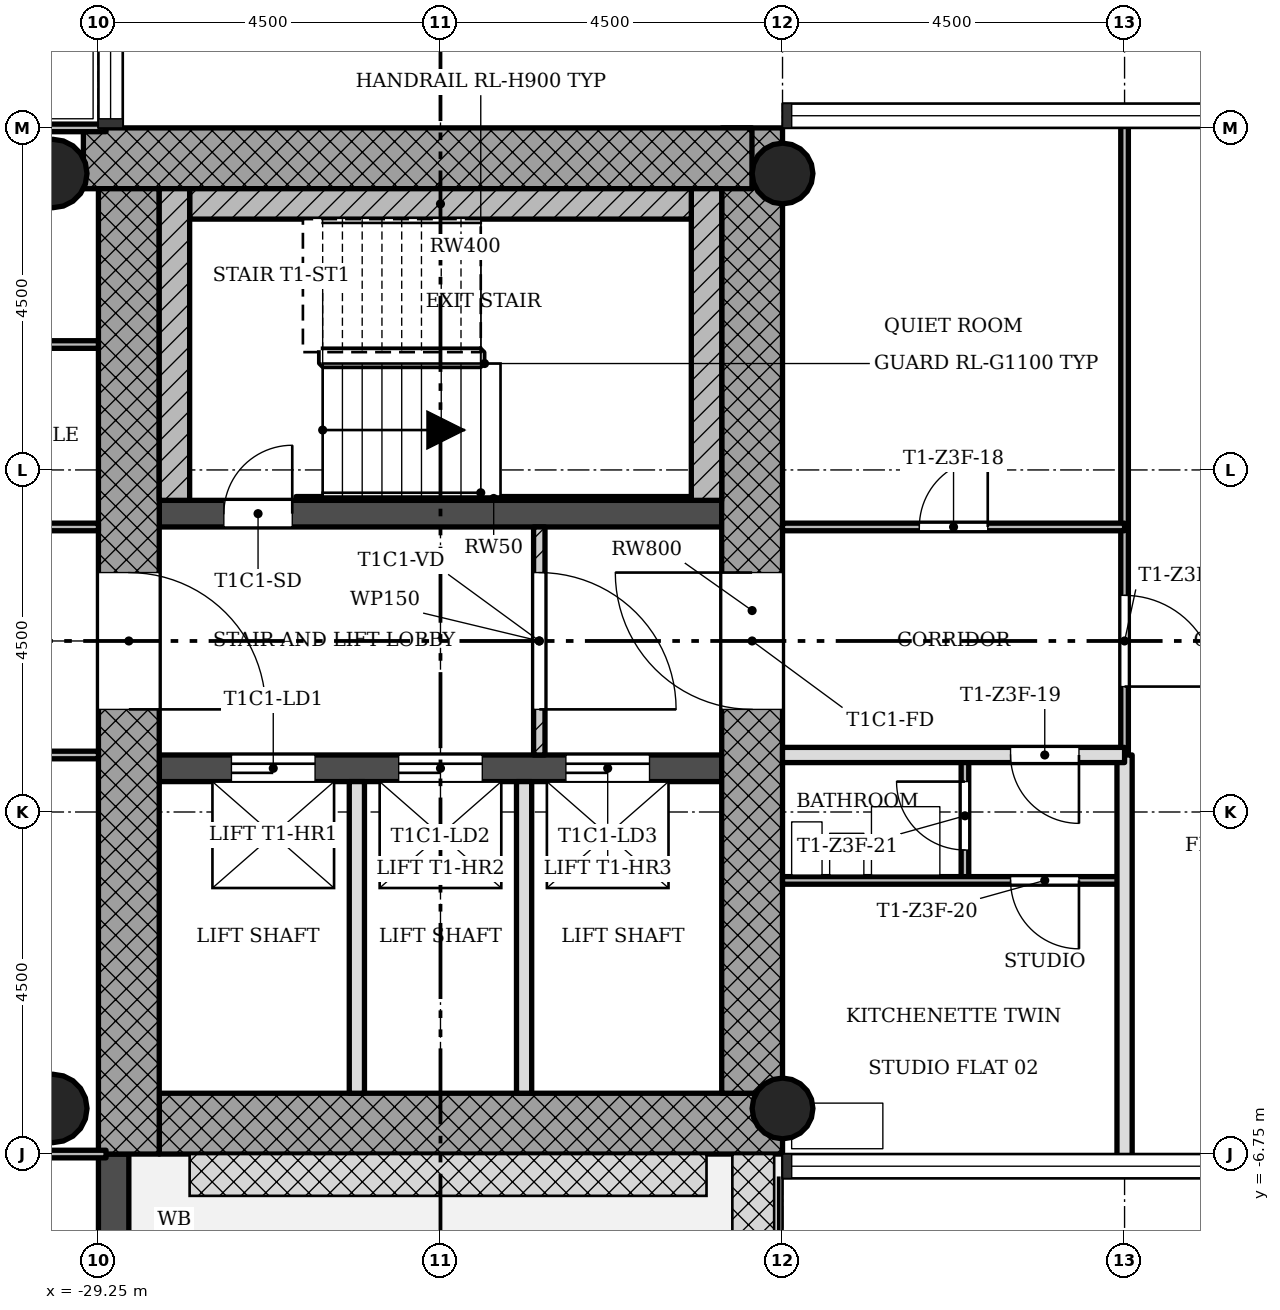
"""IFC4 building model, lengths in metres.
Left out: names, types, materials, properties, quantities, classifications, styles, units other than length and angle.
Written with IfcOpenShell. Run it as: python <this file> out.ifc"""

import sys

from ifc_helpers import new_model, si_unit, direction, frame, frame_2d, origin, origin_2d, place, context, subcontext, project, spatial, rectangle, hollow_circle, extrude, element, fill, save


model = new_model("IFC4")
c1 = context("Model", 3, precision=1e-05, world=origin(), true_north=direction((0.0, 1.0)))
c2 = subcontext(c1, "Body", "Model", "MODEL_VIEW")
j1 = project(units=[si_unit("LENGTHUNIT", "METRE"), si_unit("PLANEANGLEUNIT", "RADIAN")], contexts=[c1])
p1 = place(None, origin())
s1 = spatial("IfcSite", under=j1, at=p1, CompositionType="ELEMENT")
p2 = place(p1, origin())
s2 = spatial("IfcBuilding", under=s1, at=p2, CompositionType="ELEMENT")
p3 = place(p2, frame((0.0, 0.0, 167.7)))
s3 = spatial("IfcBuildingStorey", under=s2, at=p3, CompositionType="ELEMENT", Elevation=167.7)
p4 = place(p3, frame((-28.45, -6.35, 0.0), z_axis=(0.0, 0.0, 1.0), x_axis=(1.0, 0.0, 0.0)))
e1 = element("IfcWall", 1, at=p4, inside=s3, PredefinedType="SHEAR", context=c2, shape_type="SweptSolid", body=[
    extrude(rectangle(XDim=8.2, YDim=0.8, at=frame_2d((4.1, 0.0))), origin(), (0.0, 0.0, 1.0), 3.4),
])
p5 = place(p3, frame((-20.65, -5.95, 0.0), z_axis=(0.0, 0.0, 1.0), x_axis=(0.0, 1.0, 0.0)))
e2 = element("IfcWall", 2, at=p5, inside=s3, PredefinedType="SHEAR", context=c2, shape_type="SweptSolid", body=[
    extrude(rectangle(XDim=12.7, YDim=0.8, at=frame_2d((6.35, 0.0))), origin(), (0.0, 0.0, 1.0), 3.4),
])
p6 = place(p5, frame((5.05, 0.0, 0.0)))
e3 = element("IfcOpeningElement", 3, at=p6, cuts=e2, PredefinedType="OPENING", context=c2, shape_type="SweptSolid", body=[
    extrude(rectangle(XDim=1.8, YDim=2.1, at=frame_2d((0.9, 1.05))), frame((0.0, 0.41, 0.0), z_axis=(0.0, -1.0, 0.0), x_axis=(1.0, 0.0, 0.0)), (0.0, 0.0, 1.0), 0.82),
])
p7 = place(p3, frame((-20.652, 6.35, 0.0), z_axis=(0.0, 0.0, 1.0), x_axis=(-1.0, 0.0, 0.0)))
e4 = element("IfcWall", 4, at=p7, inside=s3, PredefinedType="SHEAR", context=c2, shape_type="SweptSolid", body=[
    extrude(rectangle(XDim=8.796, YDim=0.8, at=frame_2d((4.398, 0.0))), origin(), (0.0, 0.0, 1.0), 3.4),
])
p8 = place(p3, frame((-28.85, 5.95, 0.0), z_axis=(0.0, 0.0, 1.0), x_axis=(0.0, -1.0, 0.0)))
e5 = element("IfcWall", 5, at=p8, inside=s3, PredefinedType="SHEAR", context=c2, shape_type="SweptSolid", body=[
    extrude(rectangle(XDim=12.7, YDim=0.8, at=frame_2d((6.35, 0.0))), origin(), (0.0, 0.0, 1.0), 3.4),
])
p9 = place(p8, frame((5.05, 0.0, 0.0)))
e6 = element("IfcOpeningElement", 6, at=p9, cuts=e5, PredefinedType="OPENING", context=c2, shape_type="SweptSolid", body=[
    extrude(rectangle(XDim=1.8, YDim=2.1, at=frame_2d((0.9, 1.05))), frame((0.0, 0.41, 0.0), z_axis=(0.0, -1.0, 0.0), x_axis=(1.0, 0.0, 0.0)), (0.0, 0.0, 1.0), 0.82),
])
p10 = place(p3, frame((-28.45, -1.675, 0.0), z_axis=(0.0, 0.0, 1.0), x_axis=(1.0, 0.0, 0.0)))
e7 = element("IfcWall", 7, at=p10, inside=s3, PredefinedType="SHEAR", context=c2, shape_type="SweptSolid", body=[
    extrude(rectangle(XDim=7.4, YDim=0.35, at=frame_2d((3.7, 0.0))), origin(), (0.0, 0.0, 1.0), 3.4),
])
p11 = place(p10, frame((0.95, 0.0, 0.0)))
e8 = element("IfcOpeningElement", 8, at=p11, cuts=e7, PredefinedType="OPENING", context=c2, shape_type="SweptSolid", body=[
    extrude(rectangle(XDim=1.1, YDim=2.1, at=frame_2d((0.55, 1.05))), frame((0.0, 0.185, 0.0), z_axis=(0.0, -1.0, 0.0), x_axis=(1.0, 0.0, 0.0)), (0.0, 0.0, 1.0), 0.37),
])
p12 = place(p10, frame((3.15, 0.0, 0.0)))
e9 = element("IfcOpeningElement", 9, at=p12, cuts=e7, PredefinedType="OPENING", context=c2, shape_type="SweptSolid", body=[
    extrude(rectangle(XDim=1.1, YDim=2.1, at=frame_2d((0.55, 1.05))), frame((0.0, 0.185, 0.0), z_axis=(0.0, -1.0, 0.0), x_axis=(1.0, 0.0, 0.0)), (0.0, 0.0, 1.0), 0.37),
])
p13 = place(p10, frame((5.35, 0.0, 0.0)))
e10 = element("IfcOpeningElement", 10, at=p13, cuts=e7, PredefinedType="OPENING", context=c2, shape_type="SweptSolid", body=[
    extrude(rectangle(XDim=1.1, YDim=2.1, at=frame_2d((0.55, 1.05))), frame((0.0, 0.185, 0.0), z_axis=(0.0, -1.0, 0.0), x_axis=(1.0, 0.0, 0.0)), (0.0, 0.0, 1.0), 0.37),
])
p14 = place(p3, frame((-28.45, 1.675, 0.0), z_axis=(0.0, 0.0, 1.0), x_axis=(1.0, 0.0, 0.0)))
e11 = element("IfcWall", 11, at=p14, inside=s3, PredefinedType="SHEAR", context=c2, shape_type="SweptSolid", body=[
    extrude(rectangle(XDim=7.4, YDim=0.35, at=frame_2d((3.7, 0.0))), origin(), (0.0, 0.0, 1.0), 3.4),
])
p15 = place(p14, frame((0.85, 0.0, 0.0)))
e12 = element("IfcOpeningElement", 12, at=p15, cuts=e11, PredefinedType="OPENING", context=c2, shape_type="SweptSolid", body=[
    extrude(rectangle(XDim=0.9, YDim=2.1, at=frame_2d((0.45, 1.05))), frame((0.0, 0.185, 0.0), z_axis=(0.0, -1.0, 0.0), x_axis=(1.0, 0.0, 0.0)), (0.0, 0.0, 1.0), 0.37),
])
for number, where, z_axis, x_axis in (
    (13, (-20.25, -6.15, 0.0), (0.0, 0.0, 1.0), (1.0, 0.0, 0.0)),
    (14, (-20.25, 6.15, 0.0), (0.0, 0.0, 1.0), (1.0, 0.0, 0.0)),
):
    element("IfcColumn", number, at=place(p3, frame(where, z_axis=z_axis, x_axis=x_axis)), inside=s3, PredefinedType="COLUMN", context=c2, shape_type="SweptSolid", body=[
        extrude(hollow_circle(Radius=0.4, WallThickness=0.028, at=origin_2d()), origin(), (0.0, 0.0, 1.0), 3.4),
    ])
for number, where, z_axis, x_axis in (
    (15, (-29.85, -6.15, 0.0), (0.0, 0.0, 1.0), (1.0, 0.0, 0.0)),
    (16, (-29.85, 6.15, 0.0), (0.0, 0.0, 1.0), (1.0, 0.0, 0.0)),
):
    element("IfcColumn", number, at=place(p3, frame(where, z_axis=z_axis, x_axis=x_axis)), inside=s3, PredefinedType="COLUMN", context=c2, shape_type="SweptSolid", body=[
        extrude(hollow_circle(Radius=0.45, WallThickness=0.032, at=origin_2d()), origin(), (0.0, 0.0, 1.0), 3.4),
    ])
p16 = place(p3, frame((-29.05, -11.25, -0.02), z_axis=(0.0, 0.0, 1.0), x_axis=(0.0, 1.0, 0.0)))
e17 = element("IfcWall", 17, at=p16, inside=s3, PredefinedType="STANDARD", context=c2, shape_type="SweptSolid", body=[
    extrude(rectangle(XDim=4.5, YDim=0.4, at=frame_2d((2.25, 0.0))), origin(), (0.0, 0.0, 1.0), 3.12),
])
p17 = place(p16, frame((1.35, 0.0, 0.02)))
e18 = element("IfcOpeningElement", 18, at=p17, cuts=e17, PredefinedType="OPENING", context=c2, shape_type="SweptSolid", body=[
    extrude(rectangle(XDim=1.8, YDim=2.1, at=frame_2d((0.9, 1.05))), frame((0.0, 0.21, 0.0), z_axis=(0.0, -1.0, 0.0), x_axis=(1.0, 0.0, 0.0)), (0.0, 0.0, 1.0), 0.42),
])
p18 = place(p3, frame((-23.45, -1.5, 0.0), z_axis=(0.0, 0.0, 1.0), x_axis=(0.0, 1.0, 0.0)))
e19 = element("IfcWall", 19, at=p18, inside=s3, PredefinedType="PARTITIONING", context=c2, shape_type="SweptSolid", body=[
    extrude(rectangle(XDim=3.0, YDim=0.15, at=frame_2d((1.5, 0.0))), origin(), (0.0, 0.0, 1.0), 3.0),
])
p19 = place(p18, frame((0.6, 0.0, 0.0)))
e20 = element("IfcOpeningElement", 20, at=p19, cuts=e19, PredefinedType="OPENING", context=c2, shape_type="SweptSolid", body=[
    extrude(rectangle(XDim=1.8, YDim=2.1, at=frame_2d((0.9, 1.05))), frame((0.0, 0.085, 0.0), z_axis=(0.0, -1.0, 0.0), x_axis=(1.0, 0.0, 0.0)), (0.0, 0.0, 1.0), 0.17),
])
for number, where, z_axis, x_axis in (
    (21, (-25.85, -5.95, 0.0), (0.0, 0.0, 1.0), (0.0, 1.0, 0.0)),
    (22, (-23.65, -5.95, 0.0), (0.0, 0.0, 1.0), (0.0, 1.0, 0.0)),
):
    element("IfcWall", number, at=place(p3, frame(where, z_axis=z_axis, x_axis=x_axis)), inside=s3, PredefinedType="SOLIDWALL", context=c2, shape_type="SweptSolid", body=[
        extrude(rectangle(XDim=4.1, YDim=0.2, at=frame_2d((2.05, 0.0))), origin(), (0.0, 0.0, 1.0), 3.0),
    ])
p20 = place(p3, frame((-17.85, -3.15, 0.0), z_axis=(0.0, 0.0, 1.0), x_axis=(0.0, 1.0, 0.0)))
e23 = element("IfcWall", 23, at=p20, inside=s3, PredefinedType="PARTITIONING", context=c2, shape_type="SweptSolid", body=[
    extrude(rectangle(XDim=1.65, YDim=0.1, at=frame_2d((0.825, 0.0))), origin(), (0.0, 0.0, 1.0), 3.0),
])
p21 = place(p20, frame((0.4, 0.0, 0.0)))
e24 = element("IfcOpeningElement", 24, at=p21, cuts=e23, PredefinedType="OPENING", context=c2, shape_type="SweptSolid", body=[
    extrude(rectangle(XDim=0.9, YDim=2.1, at=frame_2d((0.45, 1.05))), frame((0.0, 0.06, 0.0), z_axis=(0.0, -1.0, 0.0), x_axis=(1.0, 0.0, 0.0)), (0.0, 0.0, 1.0), 0.12),
])
p22 = place(p3, frame((-15.75, -1.5, 0.0), z_axis=(0.0, 0.0, 1.0), x_axis=(0.0, 1.0, 0.0)))
e25 = element("IfcWall", 25, at=p22, inside=s3, PredefinedType="PARTITIONING", context=c2, shape_type="SweptSolid", body=[
    extrude(rectangle(XDim=8.35, YDim=0.1, at=frame_2d((4.175, 0.0))), origin(), (0.0, 0.0, 1.0), 3.0),
])
p23 = place(p22, frame((0.9, 0.0, 0.0)))
e26 = element("IfcOpeningElement", 26, at=p23, cuts=e25, PredefinedType="OPENING", context=c2, shape_type="SweptSolid", body=[
    extrude(rectangle(XDim=1.2, YDim=2.1, at=frame_2d((0.6, 1.05))), frame((0.0, 0.06, 0.0), z_axis=(0.0, -1.0, 0.0), x_axis=(1.0, 0.0, 0.0)), (0.0, 0.0, 1.0), 0.12),
])
p24 = place(p3, frame((-15.75, -6.85, 0.0), z_axis=(0.0, 0.0, 1.0), x_axis=(0.0, 1.0, 0.0)))
e27 = element("IfcWall", 27, at=p24, inside=s3, PredefinedType="SOLIDWALL", context=c2, shape_type="SweptSolid", body=[
    extrude(rectangle(XDim=5.35, YDim=0.2, at=frame_2d((2.675, 0.0))), origin(), (0.0, 0.0, 1.0), 3.0),
])
p25 = place(p3, frame((-35.1, -6.75, 0.0), z_axis=(0.0, 0.0, 1.0), x_axis=(1.0, 0.0, 0.0)))
e28 = element("IfcWall", 28, at=p25, inside=s3, PredefinedType="PARTITIONING", context=c2, shape_type="SweptSolid", body=[
    extrude(rectangle(XDim=5.95, YDim=0.1, at=frame_2d((2.975, 0.0))), origin(), (0.0, 0.0, 1.0), 3.0),
])
p26 = place(p3, frame((-20.25, -3.15, 0.0), z_axis=(0.0, 0.0, 1.0), x_axis=(1.0, 0.0, 0.0)))
e29 = element("IfcWall", 29, at=p26, inside=s3, PredefinedType="PARTITIONING", context=c2, shape_type="SweptSolid", body=[
    extrude(rectangle(XDim=4.5, YDim=0.1, at=frame_2d((2.25, 0.0))), origin(), (0.0, 0.0, 1.0), 3.0),
])
p27 = place(p26, frame((3.0, 0.0, 0.0)))
e30 = element("IfcOpeningElement", 30, at=p27, cuts=e29, PredefinedType="OPENING", context=c2, shape_type="SweptSolid", body=[
    extrude(rectangle(XDim=0.9, YDim=2.1, at=frame_2d((0.45, 1.05))), frame((0.0, 0.06, 0.0), z_axis=(0.0, -1.0, 0.0), x_axis=(1.0, 0.0, 0.0)), (0.0, 0.0, 1.0), 0.12),
])
p28 = place(p3, frame((-31.5, -1.5, 0.0), z_axis=(0.0, 0.0, 1.0), x_axis=(1.0, 0.0, 0.0)))
e31 = element("IfcWall", 31, at=p28, inside=s3, PredefinedType="PARTITIONING", context=c2, shape_type="SweptSolid", body=[
    extrude(rectangle(XDim=2.25, YDim=0.1, at=frame_2d((1.125, 0.0))), origin(), (0.0, 0.0, 1.0), 3.0),
])
p29 = place(p3, frame((-20.25, -1.5, 0.0), z_axis=(0.0, 0.0, 1.0), x_axis=(1.0, 0.0, 0.0)))
e32 = element("IfcWall", 32, at=p29, inside=s3, PredefinedType="SOLIDWALL", context=c2, shape_type="SweptSolid", body=[
    extrude(rectangle(XDim=4.5, YDim=0.2, at=frame_2d((2.25, 0.0))), origin(), (0.0, 0.0, 1.0), 3.0),
])
p30 = place(p29, frame((3.0, 0.0, 0.0)))
e33 = element("IfcOpeningElement", 33, at=p30, cuts=e32, PredefinedType="OPENING", context=c2, shape_type="SweptSolid", body=[
    extrude(rectangle(XDim=0.9, YDim=2.1, at=frame_2d((0.45, 1.05))), frame((0.0, 0.11, 0.0), z_axis=(0.0, -1.0, 0.0), x_axis=(1.0, 0.0, 0.0)), (0.0, 0.0, 1.0), 0.22),
])
p31 = place(p3, frame((-31.5, 1.5, 0.0), z_axis=(0.0, 0.0, 1.0), x_axis=(1.0, 0.0, 0.0)))
e34 = element("IfcWall", 34, at=p31, inside=s3, PredefinedType="PARTITIONING", context=c2, shape_type="SweptSolid", body=[
    extrude(rectangle(XDim=2.25, YDim=0.1, at=frame_2d((1.125, 0.0))), origin(), (0.0, 0.0, 1.0), 3.0),
])
p32 = place(p31, frame((0.675, 0.0, 0.0)))
e35 = element("IfcOpeningElement", 35, at=p32, cuts=e34, PredefinedType="OPENING", context=c2, shape_type="SweptSolid", body=[
    extrude(rectangle(XDim=0.9, YDim=2.1, at=frame_2d((0.45, 1.05))), frame((0.0, 0.06, 0.0), z_axis=(0.0, -1.0, 0.0), x_axis=(1.0, 0.0, 0.0)), (0.0, 0.0, 1.0), 0.12),
])
p33 = place(p3, frame((-20.25, 1.5, 0.0), z_axis=(0.0, 0.0, 1.0), x_axis=(1.0, 0.0, 0.0)))
e36 = element("IfcWall", 36, at=p33, inside=s3, PredefinedType="PARTITIONING", context=c2, shape_type="SweptSolid", body=[
    extrude(rectangle(XDim=4.5, YDim=0.1, at=frame_2d((2.25, 0.0))), origin(), (0.0, 0.0, 1.0), 3.0),
])
p34 = place(p33, frame((1.8, 0.0, 0.0)))
e37 = element("IfcOpeningElement", 37, at=p34, cuts=e36, PredefinedType="OPENING", context=c2, shape_type="SweptSolid", body=[
    extrude(rectangle(XDim=0.9, YDim=2.1, at=frame_2d((0.45, 1.05))), frame((0.0, 0.06, 0.0), z_axis=(0.0, -1.0, 0.0), x_axis=(1.0, 0.0, 0.0)), (0.0, 0.0, 1.0), 0.12),
])
p35 = place(p3, frame((-31.5, 3.9, 0.0), z_axis=(0.0, 0.0, 1.0), x_axis=(1.0, 0.0, 0.0)))
e38 = element("IfcWall", 38, at=p35, inside=s3, PredefinedType="PARTITIONING", context=c2, shape_type="SweptSolid", body=[
    extrude(rectangle(XDim=2.25, YDim=0.1, at=frame_2d((1.125, 0.0))), origin(), (0.0, 0.0, 1.0), 3.0),
])
p36 = place(p3, frame((-35.1, 6.75, 0.0), z_axis=(0.0, 0.0, 1.0), x_axis=(1.0, 0.0, 0.0)))
e39 = element("IfcWall", 39, at=p36, inside=s3, PredefinedType="PARTITIONING", context=c2, shape_type="SweptSolid", body=[
    extrude(rectangle(XDim=5.95, YDim=0.1, at=frame_2d((2.975, 0.0))), origin(), (0.0, 0.0, 1.0), 3.0),
])
p37 = place(p3, frame((-21.25, 1.85, 0.0), z_axis=(0.0, 0.0, 1.0), x_axis=(0.0, 1.0, 0.0)))
e40 = element("IfcWall", 40, at=p37, inside=s3, PredefinedType="SHEAR", context=c2, shape_type="SweptSolid", body=[
    extrude(rectangle(XDim=4.1, YDim=0.4, at=frame_2d((2.05, 0.0))), origin(), (0.0, 0.0, 1.0), 3.4),
])
p38 = place(p3, frame((-28.05, 5.75, 0.0), z_axis=(0.0, 0.0, 1.0), x_axis=(1.0, 0.0, 0.0)))
e41 = element("IfcWall", 41, at=p38, inside=s3, PredefinedType="SHEAR", context=c2, shape_type="SweptSolid", body=[
    extrude(rectangle(XDim=6.6, YDim=0.4, at=frame_2d((3.3, 0.0))), origin(), (0.0, 0.0, 1.0), 3.4),
])
p39 = place(p3, frame((-28.25, 1.85, 0.0), z_axis=(0.0, 0.0, 1.0), x_axis=(0.0, 1.0, 0.0)))
e42 = element("IfcWall", 42, at=p39, inside=s3, PredefinedType="SHEAR", context=c2, shape_type="SweptSolid", body=[
    extrude(rectangle(XDim=4.1, YDim=0.4, at=frame_2d((2.05, 0.0))), origin(), (0.0, 0.0, 1.0), 3.4),
])
p40 = place(p3, frame((-26.65, 1.875, 0.0), z_axis=(0.0, 0.0, 1.0), x_axis=(1.0, 0.0, 0.0)))
e43 = element("IfcWall", 43, at=p40, inside=s3, PredefinedType="SHEAR", context=c2, shape_type="SweptSolid", body=[
    extrude(rectangle(XDim=5.2, YDim=0.05, at=frame_2d((2.6, 0.0))), origin(), (0.0, 0.0, 1.0), 3.4),
])
p41 = place(p19, origin())
e44 = element("IfcDoor", 44, at=p41, inside=s3, OperationType="SINGLE_SWING_LEFT", PredefinedType="DOOR", context=c2, shape_type="SweptSolid", body=[
    extrude(rectangle(XDim=1.8, YDim=2.1, at=frame_2d((0.9, 1.05))), frame((0.0, 0.025, 0.0), z_axis=(0.0, -1.0, 0.0), x_axis=(1.0, 0.0, 0.0)), (0.0, 0.0, 1.0), 0.05),
])
fill(e20, e44)
p42 = place(p34, origin())
e45 = element("IfcDoor", 45, at=p42, inside=s3, OperationType="SINGLE_SWING_LEFT", PredefinedType="DOOR", context=c2, shape_type="SweptSolid", body=[
    extrude(rectangle(XDim=0.9, YDim=2.1, at=frame_2d((0.45, 1.05))), frame((0.0, 0.025, 0.0), z_axis=(0.0, -1.0, 0.0), x_axis=(1.0, 0.0, 0.0)), (0.0, 0.0, 1.0), 0.05),
])
fill(e37, e45)
p43 = place(p30, origin())
e46 = element("IfcDoor", 46, at=p43, inside=s3, OperationType="SINGLE_SWING_RIGHT", PredefinedType="DOOR", context=c2, shape_type="SweptSolid", body=[
    extrude(rectangle(XDim=0.9, YDim=2.1, at=frame_2d((0.45, 1.05))), frame((0.0, 0.025, 0.0), z_axis=(0.0, -1.0, 0.0), x_axis=(1.0, 0.0, 0.0)), (0.0, 0.0, 1.0), 0.05),
])
fill(e33, e46)
p44 = place(p27, origin())
e47 = element("IfcDoor", 47, at=p44, inside=s3, OperationType="SINGLE_SWING_RIGHT", PredefinedType="DOOR", context=c2, shape_type="SweptSolid", body=[
    extrude(rectangle(XDim=0.9, YDim=2.1, at=frame_2d((0.45, 1.05))), frame((0.0, 0.025, 0.0), z_axis=(0.0, -1.0, 0.0), x_axis=(1.0, 0.0, 0.0)), (0.0, 0.0, 1.0), 0.05),
])
fill(e30, e47)
p45 = place(p21, origin())
e48 = element("IfcDoor", 48, at=p45, inside=s3, OperationType="SINGLE_SWING_LEFT", PredefinedType="DOOR", context=c2, shape_type="SweptSolid", body=[
    extrude(rectangle(XDim=0.9, YDim=2.1, at=frame_2d((0.45, 1.05))), frame((0.0, 0.025, 0.0), z_axis=(0.0, -1.0, 0.0), x_axis=(1.0, 0.0, 0.0)), (0.0, 0.0, 1.0), 0.05),
])
fill(e24, e48)
p46 = place(p23, origin())
e49 = element("IfcDoor", 49, at=p46, inside=s3, OperationType="SINGLE_SWING_LEFT", PredefinedType="DOOR", context=c2, shape_type="SweptSolid", body=[
    extrude(rectangle(XDim=1.2, YDim=2.1, at=frame_2d((0.6, 1.05))), frame((0.0, 0.025, 0.0), z_axis=(0.0, -1.0, 0.0), x_axis=(1.0, 0.0, 0.0)), (0.0, 0.0, 1.0), 0.05),
])
fill(e26, e49)
p47 = place(p15, origin())
e50 = element("IfcDoor", 50, at=p47, inside=s3, OperationType="SINGLE_SWING_LEFT", PredefinedType="DOOR", context=c2, shape_type="SweptSolid", body=[
    extrude(rectangle(XDim=0.9, YDim=2.1, at=frame_2d((0.45, 1.05))), frame((0.0, 0.025, 0.0), z_axis=(0.0, -1.0, 0.0), x_axis=(1.0, 0.0, 0.0)), (0.0, 0.0, 1.0), 0.05),
])
fill(e12, e50)
p48 = place(p11, origin())
e51 = element("IfcDoor", 51, at=p48, inside=s3, OperationType="SLIDING_TO_LEFT", PredefinedType="DOOR", context=c2, shape_type="SweptSolid", body=[
    extrude(rectangle(XDim=1.1, YDim=2.1, at=frame_2d((0.55, 1.05))), frame((0.0, 0.025, 0.0), z_axis=(0.0, -1.0, 0.0), x_axis=(1.0, 0.0, 0.0)), (0.0, 0.0, 1.0), 0.05),
])
fill(e8, e51)
p49 = place(p12, origin())
e52 = element("IfcDoor", 52, at=p49, inside=s3, OperationType="SLIDING_TO_LEFT", PredefinedType="DOOR", context=c2, shape_type="SweptSolid", body=[
    extrude(rectangle(XDim=1.1, YDim=2.1, at=frame_2d((0.55, 1.05))), frame((0.0, 0.025, 0.0), z_axis=(0.0, -1.0, 0.0), x_axis=(1.0, 0.0, 0.0)), (0.0, 0.0, 1.0), 0.05),
])
fill(e9, e52)
p50 = place(p13, origin())
e53 = element("IfcDoor", 53, at=p50, inside=s3, OperationType="SLIDING_TO_LEFT", PredefinedType="DOOR", context=c2, shape_type="SweptSolid", body=[
    extrude(rectangle(XDim=1.1, YDim=2.1, at=frame_2d((0.55, 1.05))), frame((0.0, 0.025, 0.0), z_axis=(0.0, -1.0, 0.0), x_axis=(1.0, 0.0, 0.0)), (0.0, 0.0, 1.0), 0.05),
])
fill(e10, e53)
p51 = place(p9, origin())
e54 = element("IfcDoor", 54, at=p51, inside=s3, OperationType="SINGLE_SWING_LEFT", PredefinedType="DOOR", context=c2, shape_type="SweptSolid", body=[
    extrude(rectangle(XDim=1.8, YDim=2.1, at=frame_2d((0.9, 1.05))), frame((0.0, 0.025, 0.0), z_axis=(0.0, -1.0, 0.0), x_axis=(1.0, 0.0, 0.0)), (0.0, 0.0, 1.0), 0.05),
])
fill(e6, e54)
p52 = place(p6, origin())
e55 = element("IfcDoor", 55, at=p52, inside=s3, OperationType="SINGLE_SWING_LEFT", PredefinedType="DOOR", context=c2, shape_type="SweptSolid", body=[
    extrude(rectangle(XDim=1.8, YDim=2.1, at=frame_2d((0.9, 1.05))), frame((0.0, 0.025, 0.0), z_axis=(0.0, -1.0, 0.0), x_axis=(1.0, 0.0, 0.0)), (0.0, 0.0, 1.0), 0.05),
])
fill(e3, e55)
save(model, sys.argv[1])
